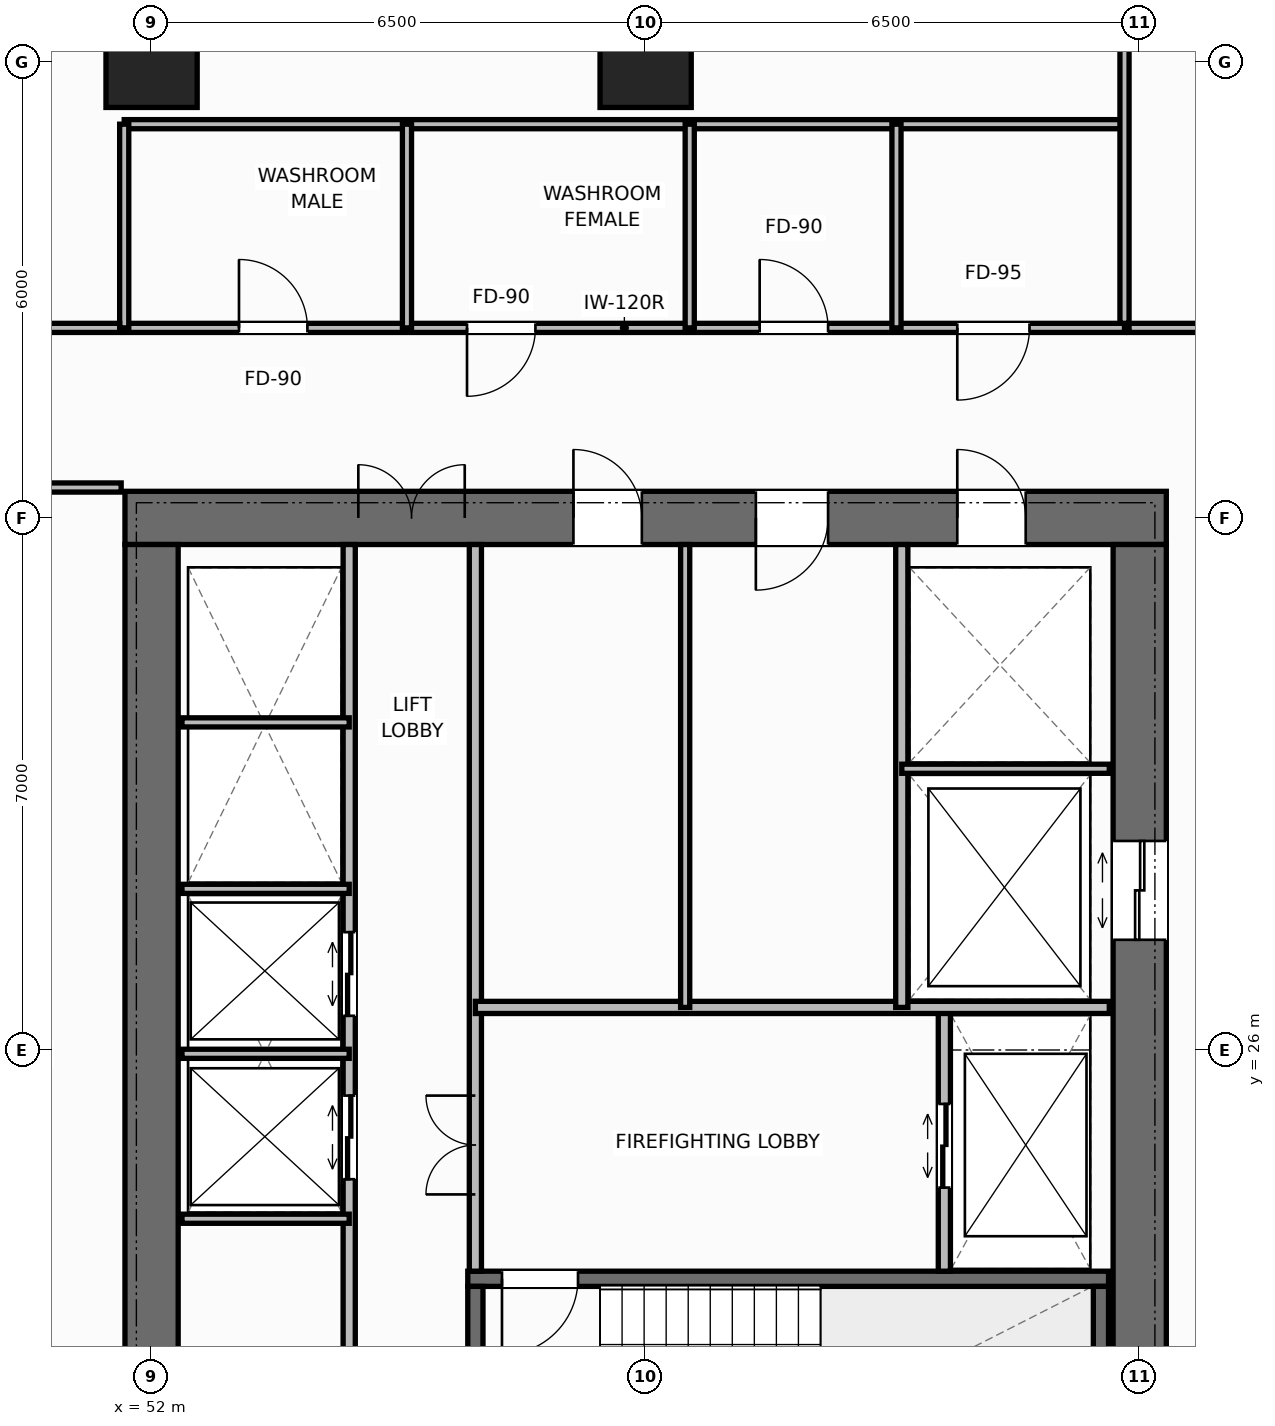
"""IFC4 building model, lengths in metres.
Left out: names, types, materials, properties, quantities, classifications, styles, units other than length and angle.
Written with IfcOpenShell. Run it as: python <this file> out.ifc"""

import sys

from ifc_helpers import new_model, si_unit, direction, frame, frame_2d, origin, origin_2d, place, context, subcontext, project, spatial, rectangle, extrude, element, fill, save


model = new_model("IFC4")
c1 = context("Model", 3, precision=1e-05, world=origin(), true_north=direction((0.0, 1.0)))
c2 = subcontext(c1, "Body", "Model", "MODEL_VIEW")
j1 = project(units=[si_unit("LENGTHUNIT", "METRE"), si_unit("PLANEANGLEUNIT", "RADIAN")], contexts=[c1])
p1 = place(None, origin())
s1 = spatial("IfcSite", under=j1, at=p1, CompositionType="ELEMENT")
p2 = place(p1, origin())
s2 = spatial("IfcBuilding", under=s1, at=p2, CompositionType="ELEMENT")
p3 = place(p2, frame((0.0, 0.0, 131.6)))
s3 = spatial("IfcBuildingStorey", under=s2, at=p3, CompositionType="ELEMENT", Elevation=131.6)
p4 = place(p3, frame((51.65, 33.0, 0.0), z_axis=(0.0, 0.0, 1.0), x_axis=(1.0, 0.0, 0.0)))
e1 = element("IfcWall", 1, at=p4, inside=s3, PredefinedType="SHEAR", context=c2, shape_type="SweptSolid", body=[
    extrude(rectangle(XDim=13.7, YDim=0.7, at=frame_2d((6.85, 0.0))), origin(), (0.0, 0.0, 1.0), 3.8),
])
p5 = place(p4, frame((3.07, 0.0, 0.0)))
e2 = element("IfcOpeningElement", 2, at=p5, cuts=e1, PredefinedType="OPENING", context=c2, shape_type="SweptSolid", body=[
    extrude(rectangle(XDim=1.4, YDim=2.2, at=frame_2d((0.7, 1.1))), frame((0.0, 0.36, 0.0), z_axis=(0.0, -1.0, 0.0), x_axis=(1.0, 0.0, 0.0)), (0.0, 0.0, 1.0), 0.72),
])
p6 = place(p4, frame((10.95, 0.0, 0.0)))
e3 = element("IfcOpeningElement", 3, at=p6, cuts=e1, PredefinedType="OPENING", context=c2, shape_type="SweptSolid", body=[
    extrude(rectangle(XDim=0.9, YDim=2.15, at=frame_2d((0.45, 1.075))), frame((0.0, 0.36, 0.0), z_axis=(0.0, -1.0, 0.0), x_axis=(1.0, 0.0, 0.0)), (0.0, 0.0, 1.0), 0.72),
])
p7 = place(p4, frame((5.9, 0.0, 0.0)))
e4 = element("IfcOpeningElement", 4, at=p7, cuts=e1, PredefinedType="OPENING", context=c2, shape_type="SweptSolid", body=[
    extrude(rectangle(XDim=0.9, YDim=2.15, at=frame_2d((0.45, 1.075))), frame((0.0, 0.36, 0.0), z_axis=(0.0, -1.0, 0.0), x_axis=(1.0, 0.0, 0.0)), (0.0, 0.0, 1.0), 0.72),
])
p8 = place(p4, frame((8.3, 0.0, 0.0)))
e5 = element("IfcOpeningElement", 5, at=p8, cuts=e1, PredefinedType="OPENING", context=c2, shape_type="SweptSolid", body=[
    extrude(rectangle(XDim=0.95, YDim=2.15, at=frame_2d((0.475, 1.075))), frame((0.0, 0.36, 0.0), z_axis=(0.0, -1.0, 0.0), x_axis=(1.0, 0.0, 0.0)), (0.0, 0.0, 1.0), 0.72),
])
p9 = place(p3, frame((52.0, 19.35, 0.0), z_axis=(0.0, 0.0, 1.0), x_axis=(0.0, 1.0, 0.0)))
e6 = element("IfcWall", 6, at=p9, inside=s3, PredefinedType="SHEAR", context=c2, shape_type="SweptSolid", body=[
    extrude(rectangle(XDim=13.3, YDim=0.7, at=frame_2d((6.65, 0.0))), origin(), (0.0, 0.0, 1.0), 3.8),
])
p10 = place(p3, frame((65.0, 19.35, 0.0), z_axis=(0.0, 0.0, 1.0), x_axis=(0.0, 1.0, 0.0)))
e7 = element("IfcWall", 7, at=p10, inside=s3, PredefinedType="SHEAR", context=c2, shape_type="SweptSolid", body=[
    extrude(rectangle(XDim=13.3, YDim=0.7, at=frame_2d((6.65, 0.0))), origin(), (0.0, 0.0, 1.0), 3.8),
])
p11 = place(p10, frame((8.1, 0.0, 0.0)))
e8 = element("IfcOpeningElement", 8, at=p11, cuts=e7, PredefinedType="OPENING", context=c2, shape_type="SweptSolid", body=[
    extrude(rectangle(XDim=1.3, YDim=2.2, at=frame_2d((0.65, 1.1))), frame((0.0, 0.36, 0.0), z_axis=(0.0, -1.0, 0.0), x_axis=(1.0, 0.0, 0.0)), (0.0, 0.0, 1.0), 0.72),
])
p12 = place(p3, frame((56.16, 22.99, 0.0), z_axis=(0.0, 0.0, 1.0), x_axis=(1.0, 0.0, 0.0)))
e9 = element("IfcWall", 9, at=p12, inside=s3, PredefinedType="SHEAR", context=c2, shape_type="SweptSolid", body=[
    extrude(rectangle(XDim=8.43, YDim=0.2, at=frame_2d((4.215, 0.0))), origin(), (0.0, 0.0, 1.0), 3.8),
])
p13 = place(p12, frame((0.45, 0.0, 0.0)))
e10 = element("IfcOpeningElement", 10, at=p13, cuts=e9, PredefinedType="OPENING", context=c2, shape_type="SweptSolid", body=[
    extrude(rectangle(XDim=1.0, YDim=2.15, at=frame_2d((0.5, 1.075))), frame((0.0, 0.11, 0.0), z_axis=(0.0, -1.0, 0.0), x_axis=(1.0, 0.0, 0.0)), (0.0, 0.0, 1.0), 0.22),
])
for number, where, z_axis, x_axis in (
    (11, (56.26, 19.61, 0.0), (0.0, 0.0, 1.0), (0.0, 1.0, 0.0)),
    (12, (64.49, 19.61, 0.0), (0.0, 0.0, 1.0), (0.0, 1.0, 0.0)),
):
    element("IfcWall", number, at=place(p3, frame(where, z_axis=z_axis, x_axis=x_axis)), inside=s3, PredefinedType="SHEAR", context=c2, shape_type="SweptSolid", body=[
        extrude(rectangle(XDim=3.28, YDim=0.2, at=frame_2d((1.64, 0.0))), origin(), (0.0, 0.0, 1.0), 3.8),
    ])
for number, where, z_axis, x_axis in (
    (13, (58.5, 39.0, 0.0), (0.0, 0.0, 1.0), (1.0, 0.0, 0.0)),
    (14, (52.0, 39.0, 0.0), (0.0, 0.0, 1.0), (1.0, 0.0, 0.0)),
):
    element("IfcColumn", number, at=place(p3, frame(where, z_axis=z_axis, x_axis=x_axis)), inside=s3, PredefinedType="COLUMN", context=c2, shape_type="SweptSolid", body=[
        extrude(rectangle(XDim=1.2, YDim=1.2, at=origin_2d()), origin(), (0.0, 0.0, 1.0), 3.8),
    ])
p14 = place(p3, frame((54.6, 19.35, 0.0), z_axis=(0.0, 0.0, 1.0), x_axis=(0.0, 1.0, 0.0)))
e15 = element("IfcWall", 15, at=p14, inside=s3, PredefinedType="STANDARD", context=c2, shape_type="SweptSolid", body=[
    extrude(rectangle(XDim=13.3, YDim=0.16, at=frame_2d((6.65, 0.0))), origin(), (0.0, 0.0, 1.0), 3.565),
])
p15 = place(p14, frame((1.65, 0.0, 0.0)))
e16 = element("IfcOpeningElement", 16, at=p15, cuts=e15, PredefinedType="OPENING", context=c2, shape_type="SweptSolid", body=[
    extrude(rectangle(XDim=0.95, YDim=2.15, at=frame_2d((0.475, 1.075))), frame((0.0, 0.09, 0.0), z_axis=(0.0, -1.0, 0.0), x_axis=(1.0, 0.0, 0.0)), (0.0, 0.0, 1.0), 0.18),
])
p16 = place(p14, frame((4.95, 0.0, 0.0)))
e17 = element("IfcOpeningElement", 17, at=p16, cuts=e15, PredefinedType="OPENING", context=c2, shape_type="SweptSolid", body=[
    extrude(rectangle(XDim=1.1, YDim=2.2, at=frame_2d((0.55, 1.1))), frame((0.0, 0.09, 0.0), z_axis=(0.0, -1.0, 0.0), x_axis=(1.0, 0.0, 0.0)), (0.0, 0.0, 1.0), 0.18),
])
p17 = place(p14, frame((7.1, 0.0, 0.0)))
e18 = element("IfcOpeningElement", 18, at=p17, cuts=e15, PredefinedType="OPENING", context=c2, shape_type="SweptSolid", body=[
    extrude(rectangle(XDim=1.1, YDim=2.2, at=frame_2d((0.55, 1.1))), frame((0.0, 0.09, 0.0), z_axis=(0.0, -1.0, 0.0), x_axis=(1.0, 0.0, 0.0)), (0.0, 0.0, 1.0), 0.18),
])
p18 = place(p3, frame((56.26, 23.09, 0.0), z_axis=(0.0, 0.0, 1.0), x_axis=(0.0, 1.0, 0.0)))
e19 = element("IfcWall", 19, at=p18, inside=s3, PredefinedType="STANDARD", context=c2, shape_type="SweptSolid", body=[
    extrude(rectangle(XDim=9.56, YDim=0.16, at=frame_2d((4.78, 0.0))), origin(), (0.0, 0.0, 1.0), 3.565),
])
p19 = place(p18, frame((1.01, 0.0, 0.0)))
e20 = element("IfcOpeningElement", 20, at=p19, cuts=e19, PredefinedType="OPENING", context=c2, shape_type="SweptSolid", body=[
    extrude(rectangle(XDim=1.3, YDim=2.2, at=frame_2d((0.65, 1.1))), frame((0.0, 0.09, 0.0), z_axis=(0.0, -1.0, 0.0), x_axis=(1.0, 0.0, 0.0)), (0.0, 0.0, 1.0), 0.18),
])
for number, where, z_axis, x_axis in (
    (21, (52.4, 23.78, 0.0), (0.0, 0.0, 1.0), (1.0, 0.0, 0.0)),
    (22, (52.4, 25.95, 0.0), (0.0, 0.0, 1.0), (1.0, 0.0, 0.0)),
    (23, (52.4, 28.12, 0.0), (0.0, 0.0, 1.0), (1.0, 0.0, 0.0)),
    (24, (52.4, 30.31, 0.0), (0.0, 0.0, 1.0), (1.0, 0.0, 0.0)),
):
    element("IfcWall", number, at=place(p3, frame(where, z_axis=z_axis, x_axis=x_axis)), inside=s3, PredefinedType="PARTITIONING", context=c2, shape_type="SweptSolid", body=[
        extrude(rectangle(XDim=2.2, YDim=0.12, at=frame_2d((1.1, 0.0))), origin(), (0.0, 0.0, 1.0), 3.565),
    ])
p20 = place(p3, frame((62.43, 23.09, 0.0), z_axis=(0.0, 0.0, 1.0), x_axis=(0.0, 1.0, 0.0)))
e25 = element("IfcWall", 25, at=p20, inside=s3, PredefinedType="STANDARD", context=c2, shape_type="SweptSolid", body=[
    extrude(rectangle(XDim=3.47, YDim=0.16, at=frame_2d((1.735, 0.0))), origin(), (0.0, 0.0, 1.0), 3.565),
])
p21 = place(p20, frame((1.1, 0.0, 0.0)))
e26 = element("IfcOpeningElement", 26, at=p21, cuts=e25, PredefinedType="OPENING", context=c2, shape_type="SweptSolid", body=[
    extrude(rectangle(XDim=1.1, YDim=2.2, at=frame_2d((0.55, 1.1))), frame((0.0, 0.09, 0.0), z_axis=(0.0, -1.0, 0.0), x_axis=(1.0, 0.0, 0.0)), (0.0, 0.0, 1.0), 0.18),
])
p22 = place(p3, frame((56.26, 26.56, 0.0), z_axis=(0.0, 0.0, 1.0), x_axis=(1.0, 0.0, 0.0)))
e27 = element("IfcWall", 27, at=p22, inside=s3, PredefinedType="STANDARD", context=c2, shape_type="SweptSolid", body=[
    extrude(rectangle(XDim=8.34, YDim=0.16, at=frame_2d((4.17, 0.0))), origin(), (0.0, 0.0, 1.0), 3.565),
])
p23 = place(p3, frame((61.87, 26.56, 0.0), z_axis=(0.0, 0.0, 1.0), x_axis=(0.0, 1.0, 0.0)))
e28 = element("IfcWall", 28, at=p23, inside=s3, PredefinedType="STANDARD", context=c2, shape_type="SweptSolid", body=[
    extrude(rectangle(XDim=6.09, YDim=0.16, at=frame_2d((3.045, 0.0))), origin(), (0.0, 0.0, 1.0), 3.565),
])
p24 = place(p3, frame((61.87, 29.7, 0.0), z_axis=(0.0, 0.0, 1.0), x_axis=(1.0, 0.0, 0.0)))
e29 = element("IfcWall", 29, at=p24, inside=s3, PredefinedType="PARTITIONING", context=c2, shape_type="SweptSolid", body=[
    extrude(rectangle(XDim=2.73, YDim=0.12, at=frame_2d((1.365, 0.0))), origin(), (0.0, 0.0, 1.0), 3.565),
])
p25 = place(p3, frame((59.02, 26.56, 0.0), z_axis=(0.0, 0.0, 1.0), x_axis=(0.0, 1.0, 0.0)))
e30 = element("IfcWall", 30, at=p25, inside=s3, PredefinedType="PARTITIONING", context=c2, shape_type="SweptSolid", body=[
    extrude(rectangle(XDim=6.09, YDim=0.12, at=frame_2d((3.045, 0.0))), origin(), (0.0, 0.0, 1.0), 3.565),
])
p26 = place(p3, frame((48.0, 33.4, 0.0), z_axis=(0.0, 0.0, 1.0), x_axis=(1.0, 0.0, 0.0)))
e31 = element("IfcWall", 31, at=p26, inside=s3, PredefinedType="PARTITIONING", context=c2, shape_type="SweptSolid", body=[
    extrude(rectangle(XDim=3.6, YDim=0.12, at=frame_2d((1.8, 0.0))), origin(), (0.0, 0.0, 1.0), 3.565),
])
p27 = place(p26, frame((1.1, 0.0, 0.0)))
e32 = element("IfcOpeningElement", 32, at=p27, cuts=e31, PredefinedType="OPENING", context=c2, shape_type="SweptSolid", body=[
    extrude(rectangle(XDim=0.95, YDim=2.15, at=frame_2d((0.475, 1.075))), frame((0.0, 0.07, 0.0), z_axis=(0.0, -1.0, 0.0), x_axis=(1.0, 0.0, 0.0)), (0.0, 0.0, 1.0), 0.14),
])
p28 = place(p3, frame((51.64, 35.5, 0.0), z_axis=(0.0, 0.0, 1.0), x_axis=(1.0, 0.0, 0.0)))
e33 = element("IfcWall", 33, at=p28, inside=s3, PredefinedType="PARTITIONING", context=c2, shape_type="SweptSolid", body=[
    extrude(rectangle(XDim=13.16, YDim=0.12, at=frame_2d((6.58, 0.0))), origin(), (0.0, 0.0, 1.0), 3.565),
])
p29 = place(p28, frame((1.51, 0.0, 0.0)))
e34 = element("IfcOpeningElement", 34, at=p29, cuts=e33, PredefinedType="OPENING", context=c2, shape_type="SweptSolid", body=[
    extrude(rectangle(XDim=0.9, YDim=2.15, at=frame_2d((0.45, 1.075))), frame((0.0, 0.07, 0.0), z_axis=(0.0, -1.0, 0.0), x_axis=(1.0, 0.0, 0.0)), (0.0, 0.0, 1.0), 0.14),
])
p30 = place(p28, frame((4.51, 0.0, 0.0)))
e35 = element("IfcOpeningElement", 35, at=p30, cuts=e33, PredefinedType="OPENING", context=c2, shape_type="SweptSolid", body=[
    extrude(rectangle(XDim=0.9, YDim=2.15, at=frame_2d((0.45, 1.075))), frame((0.0, 0.07, 0.0), z_axis=(0.0, -1.0, 0.0), x_axis=(1.0, 0.0, 0.0)), (0.0, 0.0, 1.0), 0.14),
])
p31 = place(p28, frame((8.36, 0.0, 0.0)))
e36 = element("IfcOpeningElement", 36, at=p31, cuts=e33, PredefinedType="OPENING", context=c2, shape_type="SweptSolid", body=[
    extrude(rectangle(XDim=0.9, YDim=2.15, at=frame_2d((0.45, 1.075))), frame((0.0, 0.07, 0.0), z_axis=(0.0, -1.0, 0.0), x_axis=(1.0, 0.0, 0.0)), (0.0, 0.0, 1.0), 0.14),
])
p32 = place(p28, frame((10.96, 0.0, 0.0)))
e37 = element("IfcOpeningElement", 37, at=p32, cuts=e33, PredefinedType="OPENING", context=c2, shape_type="SweptSolid", body=[
    extrude(rectangle(XDim=0.95, YDim=2.15, at=frame_2d((0.475, 1.075))), frame((0.0, 0.07, 0.0), z_axis=(0.0, -1.0, 0.0), x_axis=(1.0, 0.0, 0.0)), (0.0, 0.0, 1.0), 0.14),
])
p33 = place(p3, frame((51.64, 38.18, 0.0), z_axis=(0.0, 0.0, 1.0), x_axis=(1.0, 0.0, 0.0)))
e38 = element("IfcWall", 38, at=p33, inside=s3, PredefinedType="PARTITIONING", context=c2, shape_type="SweptSolid", body=[
    extrude(rectangle(XDim=13.16, YDim=0.12, at=frame_2d((6.58, 0.0))), origin(), (0.0, 0.0, 1.0), 3.565),
])
for number, where, z_axis, x_axis in (
    (39, (51.64, 35.5, 0.0), (0.0, 0.0, 1.0), (0.0, 1.0, 0.0)),
    (40, (55.36, 35.5, 0.0), (0.0, 0.0, 1.0), (0.0, 1.0, 0.0)),
    (41, (59.08, 35.5, 0.0), (0.0, 0.0, 1.0), (0.0, 1.0, 0.0)),
    (42, (61.8, 35.5, 0.0), (0.0, 0.0, 1.0), (0.0, 1.0, 0.0)),
):
    element("IfcWall", number, at=place(p3, frame(where, z_axis=z_axis, x_axis=x_axis)), inside=s3, PredefinedType="PARTITIONING", context=c2, shape_type="SweptSolid", body=[
        extrude(rectangle(XDim=2.68, YDim=0.12, at=frame_2d((1.34, 0.0))), origin(), (0.0, 0.0, 1.0), 3.565),
    ])
p34 = place(p3, frame((64.8, 35.56, 0.0), z_axis=(0.0, 0.0, 1.0), x_axis=(0.0, 1.0, 0.0)))
e43 = element("IfcWall", 43, at=p34, inside=s3, PredefinedType="PARTITIONING", context=c2, shape_type="SweptSolid", body=[
    extrude(rectangle(XDim=14.72, YDim=0.12, at=frame_2d((7.36, 0.0))), origin(), (0.0, 0.0, 1.0), 2.965),
])
p35 = place(p3, frame((45.66, 35.5, 0.0), z_axis=(0.0, 0.0, 1.0), x_axis=(1.0, 0.0, 0.0)))
e44 = element("IfcWall", 44, at=p35, inside=s3, PredefinedType="PARTITIONING", context=c2, shape_type="SweptSolid", body=[
    extrude(rectangle(XDim=5.92, YDim=0.12, at=frame_2d((2.96, 0.0))), origin(), (0.0, 0.0, 1.0), 3.565),
])
p36 = place(p35, frame((3.194, 0.0, 0.0)))
e45 = element("IfcOpeningElement", 45, at=p36, cuts=e44, PredefinedType="OPENING", context=c2, shape_type="SweptSolid", body=[
    extrude(rectangle(XDim=0.95, YDim=2.15, at=frame_2d((0.475, 1.075))), frame((0.0, 0.07, 0.0), z_axis=(0.0, -1.0, 0.0), x_axis=(1.0, 0.0, 0.0)), (0.0, 0.0, 1.0), 0.14),
])
p37 = place(p3, frame((64.86, 35.5, 0.0), z_axis=(0.0, 0.0, 1.0), x_axis=(1.0, 0.0, 0.0)))
e46 = element("IfcWall", 46, at=p37, inside=s3, PredefinedType="PARTITIONING", context=c2, shape_type="SweptSolid", body=[
    extrude(rectangle(XDim=11.16, YDim=0.12, at=frame_2d((5.58, 0.0))), origin(), (0.0, 0.0, 1.0), 3.565),
])
p38 = place(p37, frame((1.31, 0.0, 0.0)))
e47 = element("IfcOpeningElement", 47, at=p38, cuts=e46, PredefinedType="OPENING", context=c2, shape_type="SweptSolid", body=[
    extrude(rectangle(XDim=0.95, YDim=2.15, at=frame_2d((0.475, 1.075))), frame((0.0, 0.07, 0.0), z_axis=(0.0, -1.0, 0.0), x_axis=(1.0, 0.0, 0.0)), (0.0, 0.0, 1.0), 0.14),
])
p39 = place(p5, origin())
e48 = element("IfcDoor", 48, at=p39, inside=s3, OperationType="DOUBLE_DOOR_SINGLE_SWING", PredefinedType="DOOR", context=c2, shape_type="SweptSolid", body=[
    extrude(rectangle(XDim=1.4, YDim=2.2, at=frame_2d((0.7, 1.1))), frame((0.0, -0.075, 0.0), z_axis=(0.0, -1.0, 0.0), x_axis=(1.0, 0.0, 0.0)), (0.0, 0.0, 1.0), 0.05),
])
fill(e2, e48)
p40 = place(p16, origin())
e49 = element("IfcDoor", 49, at=p40, inside=s3, OperationType="DOUBLE_DOOR_SLIDING", PredefinedType="DOOR", context=c2, shape_type="SweptSolid", body=[
    extrude(rectangle(XDim=1.1, YDim=2.2, at=frame_2d((0.55, 1.1))), frame((0.0, 0.025, 0.0), z_axis=(0.0, -1.0, 0.0), x_axis=(1.0, 0.0, 0.0)), (0.0, 0.0, 1.0), 0.05),
])
fill(e17, e49)
p41 = place(p17, origin())
e50 = element("IfcDoor", 50, at=p41, inside=s3, OperationType="DOUBLE_DOOR_SLIDING", PredefinedType="DOOR", context=c2, shape_type="SweptSolid", body=[
    extrude(rectangle(XDim=1.1, YDim=2.2, at=frame_2d((0.55, 1.1))), frame((0.0, 0.025, 0.0), z_axis=(0.0, -1.0, 0.0), x_axis=(1.0, 0.0, 0.0)), (0.0, 0.0, 1.0), 0.05),
])
fill(e18, e50)
p42 = place(p13, origin())
e51 = element("IfcDoor", 51, at=p42, inside=s3, OperationType="SINGLE_SWING_RIGHT", PredefinedType="DOOR", context=c2, shape_type="SweptSolid", body=[
    extrude(rectangle(XDim=1.0, YDim=2.15, at=frame_2d((0.5, 1.075))), frame((0.0, 0.025, 0.0), z_axis=(0.0, -1.0, 0.0), x_axis=(1.0, 0.0, 0.0)), (0.0, 0.0, 1.0), 0.05),
])
fill(e10, e51)
p43 = place(p21, origin())
e52 = element("IfcDoor", 52, at=p43, inside=s3, OperationType="DOUBLE_DOOR_SLIDING", PredefinedType="DOOR", context=c2, shape_type="SweptSolid", body=[
    extrude(rectangle(XDim=1.1, YDim=2.2, at=frame_2d((0.55, 1.1))), frame((0.0, 0.025, 0.0), z_axis=(0.0, -1.0, 0.0), x_axis=(1.0, 0.0, 0.0)), (0.0, 0.0, 1.0), 0.05),
])
fill(e26, e52)
p44 = place(p19, origin())
e53 = element("IfcDoor", 53, at=p44, inside=s3, OperationType="DOUBLE_DOOR_SINGLE_SWING", PredefinedType="DOOR", context=c2, shape_type="SweptSolid", body=[
    extrude(rectangle(XDim=1.3, YDim=2.2, at=frame_2d((0.65, 1.1))), frame((0.0, 0.025, 0.0), z_axis=(0.0, -1.0, 0.0), x_axis=(1.0, 0.0, 0.0)), (0.0, 0.0, 1.0), 0.05),
])
fill(e20, e53)
p45 = place(p11, origin())
e54 = element("IfcDoor", 54, at=p45, inside=s3, OperationType="DOUBLE_DOOR_SLIDING", PredefinedType="DOOR", context=c2, shape_type="SweptSolid", body=[
    extrude(rectangle(XDim=1.3, YDim=2.2, at=frame_2d((0.65, 1.1))), frame((0.0, 0.025, 0.0), z_axis=(0.0, -1.0, 0.0), x_axis=(1.0, 0.0, 0.0)), (0.0, 0.0, 1.0), 0.05),
])
fill(e8, e54)
p46 = place(p6, origin())
e55 = element("IfcDoor", 55, at=p46, inside=s3, OperationType="SINGLE_SWING_LEFT", PredefinedType="DOOR", context=c2, shape_type="SweptSolid", body=[
    extrude(rectangle(XDim=0.9, YDim=2.15, at=frame_2d((0.45, 1.075))), frame((0.0, -0.075, 0.0), z_axis=(0.0, -1.0, 0.0), x_axis=(1.0, 0.0, 0.0)), (0.0, 0.0, 1.0), 0.05),
])
fill(e3, e55)
p47 = place(p7, origin())
e56 = element("IfcDoor", 56, at=p47, inside=s3, OperationType="SINGLE_SWING_LEFT", PredefinedType="DOOR", context=c2, shape_type="SweptSolid", body=[
    extrude(rectangle(XDim=0.9, YDim=2.15, at=frame_2d((0.45, 1.075))), frame((0.0, -0.075, 0.0), z_axis=(0.0, -1.0, 0.0), x_axis=(1.0, 0.0, 0.0)), (0.0, 0.0, 1.0), 0.05),
])
fill(e4, e56)
p48 = place(p8, origin())
e57 = element("IfcDoor", 57, at=p48, inside=s3, OperationType="SINGLE_SWING_RIGHT", PredefinedType="DOOR", context=c2, shape_type="SweptSolid", body=[
    extrude(rectangle(XDim=0.95, YDim=2.15, at=frame_2d((0.475, 1.075))), frame((0.0, -0.075, 0.0), z_axis=(0.0, -1.0, 0.0), x_axis=(1.0, 0.0, 0.0)), (0.0, 0.0, 1.0), 0.05),
])
fill(e5, e57)
p49 = place(p29, origin())
e58 = element("IfcDoor", 58, at=p49, inside=s3, OperationType="SINGLE_SWING_LEFT", PredefinedType="DOOR", context=c2, shape_type="SweptSolid", body=[
    extrude(rectangle(XDim=0.9, YDim=2.15, at=frame_2d((0.45, 1.075))), frame((0.0, 0.025, 0.0), z_axis=(0.0, -1.0, 0.0), x_axis=(1.0, 0.0, 0.0)), (0.0, 0.0, 1.0), 0.05),
])
fill(e34, e58)
p50 = place(p30, origin())
e59 = element("IfcDoor", 59, at=p50, inside=s3, OperationType="SINGLE_SWING_RIGHT", PredefinedType="DOOR", context=c2, shape_type="SweptSolid", body=[
    extrude(rectangle(XDim=0.9, YDim=2.15, at=frame_2d((0.45, 1.075))), frame((0.0, 0.025, 0.0), z_axis=(0.0, -1.0, 0.0), x_axis=(1.0, 0.0, 0.0)), (0.0, 0.0, 1.0), 0.05),
])
fill(e35, e59)
p51 = place(p31, origin())
e60 = element("IfcDoor", 60, at=p51, inside=s3, OperationType="SINGLE_SWING_LEFT", PredefinedType="DOOR", context=c2, shape_type="SweptSolid", body=[
    extrude(rectangle(XDim=0.9, YDim=2.15, at=frame_2d((0.45, 1.075))), frame((0.0, 0.025, 0.0), z_axis=(0.0, -1.0, 0.0), x_axis=(1.0, 0.0, 0.0)), (0.0, 0.0, 1.0), 0.05),
])
fill(e36, e60)
p52 = place(p32, origin())
e61 = element("IfcDoor", 61, at=p52, inside=s3, OperationType="SINGLE_SWING_RIGHT", PredefinedType="DOOR", context=c2, shape_type="SweptSolid", body=[
    extrude(rectangle(XDim=0.95, YDim=2.15, at=frame_2d((0.475, 1.075))), frame((0.0, 0.025, 0.0), z_axis=(0.0, -1.0, 0.0), x_axis=(1.0, 0.0, 0.0)), (0.0, 0.0, 1.0), 0.05),
])
fill(e37, e61)
save(model, sys.argv[1])
